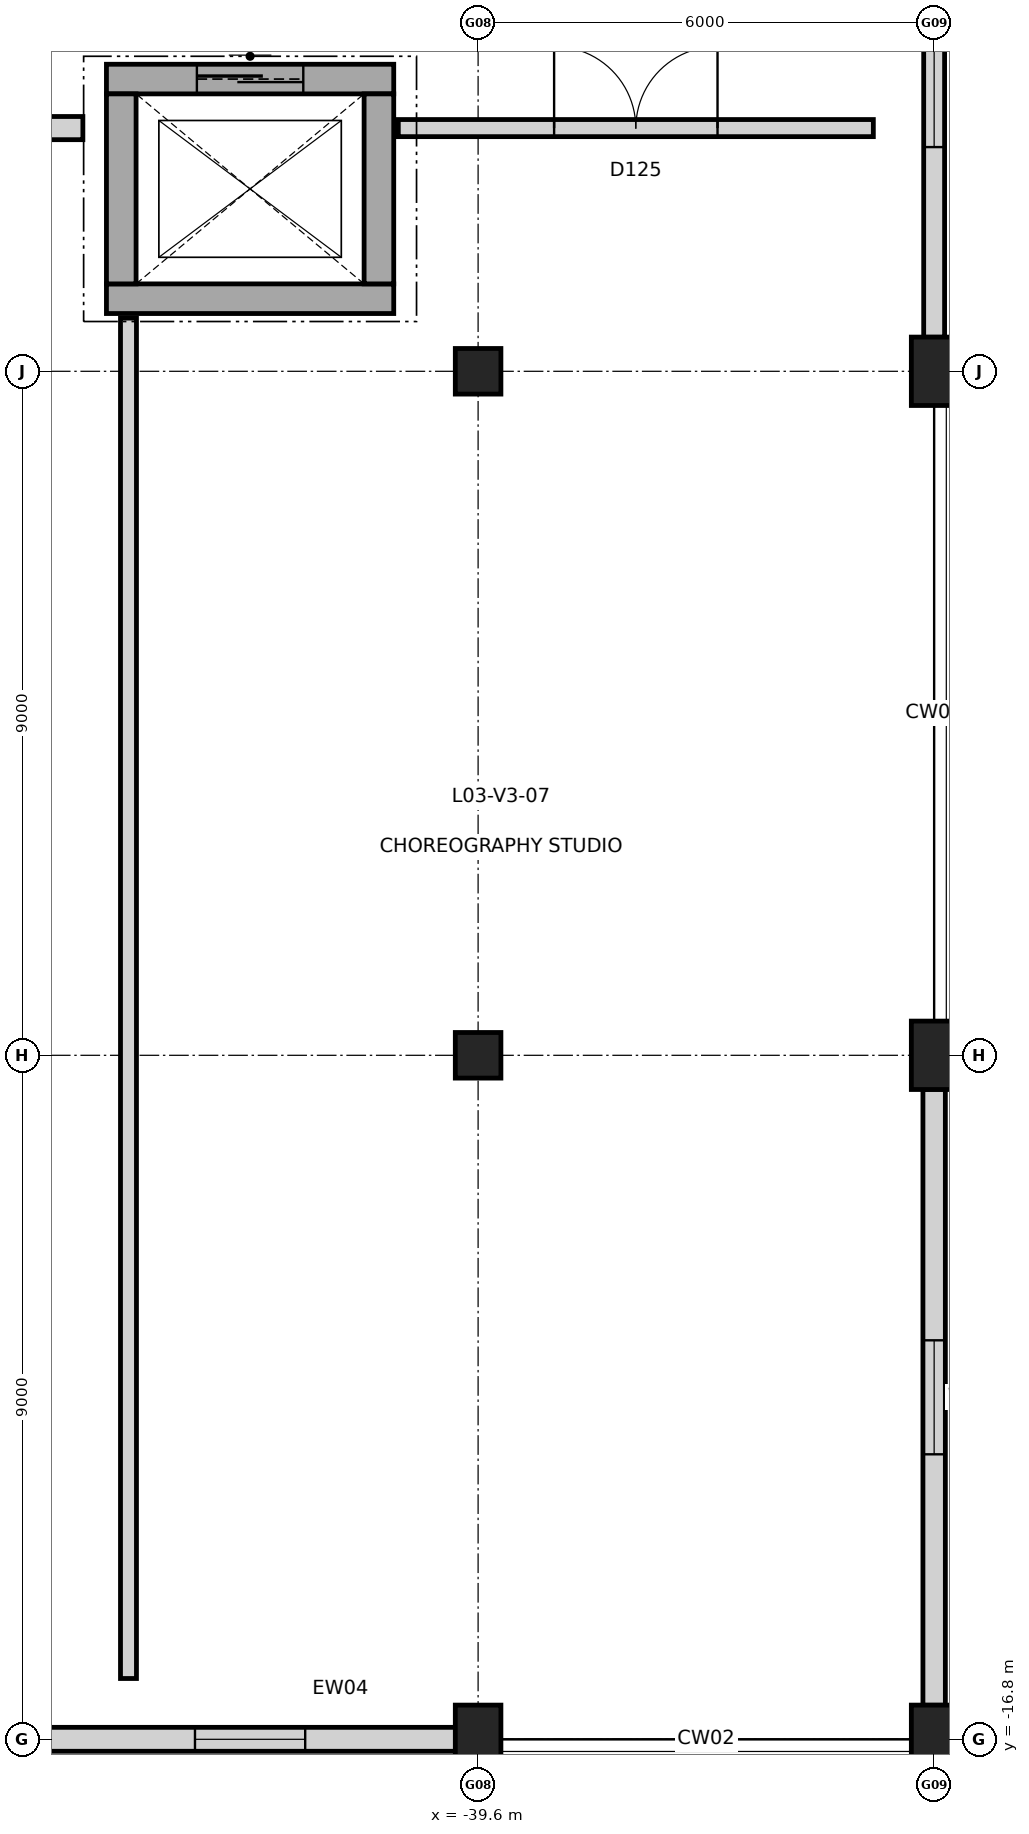
"""IFC4 building model, lengths in metres.
Left out: names, types, materials, properties, quantities, classifications, styles, units other than length and angle.
Written with IfcOpenShell. Run it as: python <this file> out.ifc"""

import sys

from ifc_helpers import new_model, si_unit, direction, frame, frame_2d, origin, origin_2d, place, context, subcontext, project, spatial, rectangle, extrude, element, fill, save


model = new_model("IFC4")
c1 = context("Model", 3, precision=1e-05, world=origin(), true_north=direction((0.0, 1.0)))
c2 = subcontext(c1, "Body", "Model", "MODEL_VIEW")
j1 = project(units=[si_unit("LENGTHUNIT", "METRE"), si_unit("PLANEANGLEUNIT", "RADIAN")], contexts=[c1])
p1 = place(None, origin())
s1 = spatial("IfcSite", under=j1, at=p1, CompositionType="ELEMENT")
p2 = place(p1, origin())
s2 = spatial("IfcBuilding", under=s1, at=p2, CompositionType="ELEMENT")
p3 = place(p2, frame((0.0, 0.0, 15.0)))
s3 = spatial("IfcBuildingStorey", under=s2, at=p3, CompositionType="ELEMENT", Elevation=15.0)
p4 = place(p3, frame((-39.6, -16.8, 0.0), z_axis=(0.0, 0.0, 1.0), x_axis=(1.0, 0.0, 0.0)))
e1 = element("IfcColumn", 1, at=p4, inside=s3, PredefinedType="COLUMN", context=c2, shape_type="SweptSolid", body=[
    extrude(rectangle(XDim=0.6, YDim=0.9, at=origin_2d()), origin(), (0.0, 0.0, 1.0), 4.8),
])
for number, where, z_axis, x_axis in (
    (2, (-39.6, -7.8, 0.0), (0.0, 0.0, 1.0), (1.0, 0.0, 0.0)),
    (3, (-39.6, 1.2, 0.0), (0.0, 0.0, 1.0), (1.0, 0.0, 0.0)),
):
    element("IfcColumn", number, at=place(p3, frame(where, z_axis=z_axis, x_axis=x_axis)), inside=s3, PredefinedType="COLUMN", context=c2, shape_type="SweptSolid", body=[
        extrude(rectangle(XDim=0.6, YDim=0.6, at=origin_2d()), origin(), (0.0, 0.0, 1.0), 4.8),
    ])
for number, where, z_axis, x_axis in (
    (4, (-33.6, -16.8, 0.0), (0.0, 0.0, 1.0), (1.0, 0.0, 0.0)),
    (5, (-33.6, -7.8, 0.0), (0.0, 0.0, 1.0), (1.0, 0.0, 0.0)),
    (6, (-33.6, 1.2, 0.0), (0.0, 0.0, 1.0), (1.0, 0.0, 0.0)),
):
    element("IfcColumn", number, at=place(p3, frame(where, z_axis=z_axis, x_axis=x_axis)), inside=s3, PredefinedType="COLUMN", context=c2, shape_type="SweptSolid", body=[
        extrude(rectangle(XDim=0.6, YDim=0.9, at=origin_2d()), origin(), (0.0, 0.0, 1.0), 4.8),
    ])
p5 = place(p3, frame((-39.898, -16.8, 0.0), z_axis=(0.0, 0.0, 1.0), x_axis=(-1.0, 0.0, 0.0)))
e7 = element("IfcWall", 7, at=p5, inside=s3, PredefinedType="STANDARD", context=c2, shape_type="SweptSolid", body=[
    extrude(rectangle(XDim=5.404, YDim=0.315, at=frame_2d((2.702, 0.0))), origin(), (0.0, 0.0, 1.0), 3.745),
])
p6 = place(p5, frame((1.977, 0.0, 0.85)))
e8 = element("IfcOpeningElement", 8, at=p6, cuts=e7, PredefinedType="OPENING", context=c2, shape_type="SweptSolid", body=[
    extrude(rectangle(XDim=1.45, YDim=2.1, at=frame_2d((0.725, 1.05))), frame((0.0, 0.167, 0.0), z_axis=(0.0, -1.0, 0.0), x_axis=(1.0, 0.0, 0.0)), (0.0, 0.0, 1.0), 0.335),
])
p7 = place(p3, frame((-33.6, 9.752, 0.0), z_axis=(0.0, 0.0, 1.0), x_axis=(0.0, -1.0, 0.0)))
e9 = element("IfcWall", 9, at=p7, inside=s3, PredefinedType="STANDARD", context=c2, shape_type="SweptSolid", body=[
    extrude(rectangle(XDim=8.104, YDim=0.275, at=frame_2d((4.052, 0.0))), origin(), (0.0, 0.0, 1.0), 3.829),
])
p8 = place(p7, frame((2.502, 0.0, 0.85)))
e10 = element("IfcOpeningElement", 10, at=p8, cuts=e9, PredefinedType="OPENING", context=c2, shape_type="SweptSolid", body=[
    extrude(rectangle(XDim=3.1, YDim=2.1, at=frame_2d((1.55, 1.05))), frame((0.0, 0.147, 0.0), z_axis=(0.0, -1.0, 0.0), x_axis=(1.0, 0.0, 0.0)), (0.0, 0.0, 1.0), 0.295),
])
p9 = place(p3, frame((-33.6, -8.248, 0.0), z_axis=(0.0, 0.0, 1.0), x_axis=(0.0, -1.0, 0.0)))
e11 = element("IfcWall", 11, at=p9, inside=s3, PredefinedType="STANDARD", context=c2, shape_type="SweptSolid", body=[
    extrude(rectangle(XDim=8.104, YDim=0.295, at=frame_2d((4.052, 0.0))), origin(), (0.0, 0.0, 1.0), 3.829),
])
p10 = place(p9, frame((3.302, 0.0, 0.6)))
e12 = element("IfcOpeningElement", 12, at=p10, cuts=e11, PredefinedType="OPENING", context=c2, shape_type="SweptSolid", body=[
    extrude(rectangle(XDim=1.5, YDim=2.35, at=frame_2d((0.75, 1.175))), frame((0.0, 0.157, 0.0), z_axis=(0.0, -1.0, 0.0), x_axis=(1.0, 0.0, 0.0)), (0.0, 0.0, 1.0), 0.315),
])
p11 = place(p3, frame((-40.71, 2.155, 0.0), z_axis=(0.0, 0.0, 1.0), x_axis=(-1.0, 0.0, 0.0)))
e13 = element("IfcWall", 13, at=p11, inside=s3, PredefinedType="SHEAR", context=c2, shape_type="SweptSolid", body=[
    extrude(rectangle(XDim=3.78, YDim=0.39, at=frame_2d((1.89, 0.0))), origin(), (0.0, 0.0, 1.0), 4.8),
])
p12 = place(p3, frame((-44.49, 5.045, 0.0), z_axis=(0.0, 0.0, 1.0), x_axis=(1.0, 0.0, 0.0)))
e14 = element("IfcWall", 14, at=p12, inside=s3, PredefinedType="SHEAR", context=c2, shape_type="SweptSolid", body=[
    extrude(rectangle(XDim=3.78, YDim=0.39, at=frame_2d((1.89, 0.0))), origin(), (0.0, 0.0, 1.0), 4.8),
])
p13 = place(p12, frame((1.19, 0.0, 0.0)))
e15 = element("IfcOpeningElement", 15, at=p13, cuts=e14, PredefinedType="OPENING", context=c2, shape_type="SweptSolid", body=[
    extrude(rectangle(XDim=1.4, YDim=2.2, at=frame_2d((0.7, 1.1))), frame((0.0, 0.205, 0.0), z_axis=(0.0, -1.0, 0.0), x_axis=(1.0, 0.0, 0.0)), (0.0, 0.0, 1.0), 0.41),
])
for number, where, z_axis, x_axis in (
    (16, (-44.295, 2.35, 0.0), (0.0, 0.0, 1.0), (0.0, 1.0, 0.0)),
    (17, (-40.905, 4.85, 0.0), (0.0, 0.0, 1.0), (0.0, -1.0, 0.0)),
):
    element("IfcWall", number, at=place(p3, frame(where, z_axis=z_axis, x_axis=x_axis)), inside=s3, PredefinedType="SHEAR", context=c2, shape_type="SweptSolid", body=[
        extrude(rectangle(XDim=2.5, YDim=0.39, at=frame_2d((1.25, 0.0))), origin(), (0.0, 0.0, 1.0), 4.8),
    ])
p14 = place(p3, frame((-51.2, 4.4, 0.0), z_axis=(0.0, 0.0, 1.0), x_axis=(1.0, 0.0, 0.0)))
e18 = element("IfcWall", 18, at=p14, inside=s3, PredefinedType="PARTITIONING", context=c2, shape_type="SweptSolid", body=[
    extrude(rectangle(XDim=6.4, YDim=0.305, at=frame_2d((3.2, 0.0))), origin(), (0.0, 0.0, 1.0), 4.42),
])
p15 = place(p14, frame((2.73, 0.0, 0.0)))
e19 = element("IfcOpeningElement", 19, at=p15, cuts=e18, PredefinedType="OPENING", context=c2, shape_type="SweptSolid", body=[
    extrude(rectangle(XDim=0.94, YDim=2.1, at=frame_2d((0.47, 1.05))), frame((0.0, 0.162, 0.0), z_axis=(0.0, -1.0, 0.0), x_axis=(1.0, 0.0, 0.0)), (0.0, 0.0, 1.0), 0.325),
])
p16 = place(p3, frame((-40.65, 4.4, 0.0), z_axis=(0.0, 0.0, 1.0), x_axis=(1.0, 0.0, 0.0)))
e20 = element("IfcWall", 20, at=p16, inside=s3, PredefinedType="PARTITIONING", context=c2, shape_type="SweptSolid", body=[
    extrude(rectangle(XDim=6.25, YDim=0.225, at=frame_2d((3.125, 0.0))), origin(), (0.0, 0.0, 1.0), 4.42),
])
p17 = place(p16, frame((2.05, 0.0, 0.0)))
e21 = element("IfcOpeningElement", 21, at=p17, cuts=e20, PredefinedType="OPENING", context=c2, shape_type="SweptSolid", body=[
    extrude(rectangle(XDim=2.15, YDim=2.4, at=frame_2d((1.075, 1.2))), frame((0.0, 0.123, 0.0), z_axis=(0.0, -1.0, 0.0), x_axis=(1.0, 0.0, 0.0)), (0.0, 0.0, 1.0), 0.245),
])
p18 = place(p3, frame((-44.2, -16.0, 0.0), z_axis=(0.0, 0.0, 1.0), x_axis=(0.0, 1.0, 0.0)))
e22 = element("IfcWall", 22, at=p18, inside=s3, PredefinedType="PARTITIONING", context=c2, shape_type="SweptSolid", body=[
    extrude(rectangle(XDim=17.9, YDim=0.21, at=frame_2d((8.95, 0.0))), origin(), (0.0, 0.0, 1.0), 4.42),
])
p19 = place(p6, origin())
e23 = element("IfcWindow", 23, at=p19, inside=s3, PartitioningType="SINGLE_PANEL", PredefinedType="WINDOW", context=c2, shape_type="SweptSolid", body=[
    extrude(rectangle(XDim=1.45, YDim=2.1, at=frame_2d((0.725, 1.05))), frame((0.0, 0.03, 0.0), z_axis=(0.0, -1.0, 0.0), x_axis=(1.0, 0.0, 0.0)), (0.0, 0.0, 1.0), 0.06),
])
fill(e8, e23)
p20 = place(p8, origin())
e24 = element("IfcWindow", 24, at=p20, inside=s3, PartitioningType="SINGLE_PANEL", PredefinedType="WINDOW", context=c2, shape_type="SweptSolid", body=[
    extrude(rectangle(XDim=3.1, YDim=2.1, at=frame_2d((1.55, 1.05))), frame((0.0, 0.03, 0.0), z_axis=(0.0, -1.0, 0.0), x_axis=(1.0, 0.0, 0.0)), (0.0, 0.0, 1.0), 0.06),
])
fill(e10, e24)
p21 = place(p10, origin())
e25 = element("IfcWindow", 25, at=p21, inside=s3, PartitioningType="SINGLE_PANEL", PredefinedType="WINDOW", context=c2, shape_type="SweptSolid", body=[
    extrude(rectangle(XDim=1.5, YDim=2.35, at=frame_2d((0.75, 1.175))), frame((0.0, 0.03, 0.0), z_axis=(0.0, -1.0, 0.0), x_axis=(1.0, 0.0, 0.0)), (0.0, 0.0, 1.0), 0.06),
])
fill(e12, e25)
p22 = place(p13, origin())
e26 = element("IfcDoor", 26, at=p22, inside=s3, OperationType="SLIDING_TO_LEFT", PredefinedType="DOOR", context=c2, shape_type="SweptSolid", body=[
    extrude(rectangle(XDim=1.4, YDim=2.2, at=frame_2d((0.7, 1.1))), frame((0.0, 0.025, 0.0), z_axis=(0.0, -1.0, 0.0), x_axis=(1.0, 0.0, 0.0)), (0.0, 0.0, 1.0), 0.05),
])
fill(e15, e26)
p23 = place(p17, origin())
e27 = element("IfcDoor", 27, at=p23, inside=s3, OperationType="DOUBLE_DOOR_SINGLE_SWING", PredefinedType="DOOR", context=c2, shape_type="SweptSolid", body=[
    extrude(rectangle(XDim=2.15, YDim=2.4, at=frame_2d((1.075, 1.2))), frame((0.0, 0.025, 0.0), z_axis=(0.0, -1.0, 0.0), x_axis=(1.0, 0.0, 0.0)), (0.0, 0.0, 1.0), 0.05),
])
fill(e21, e27)
save(model, sys.argv[1])
